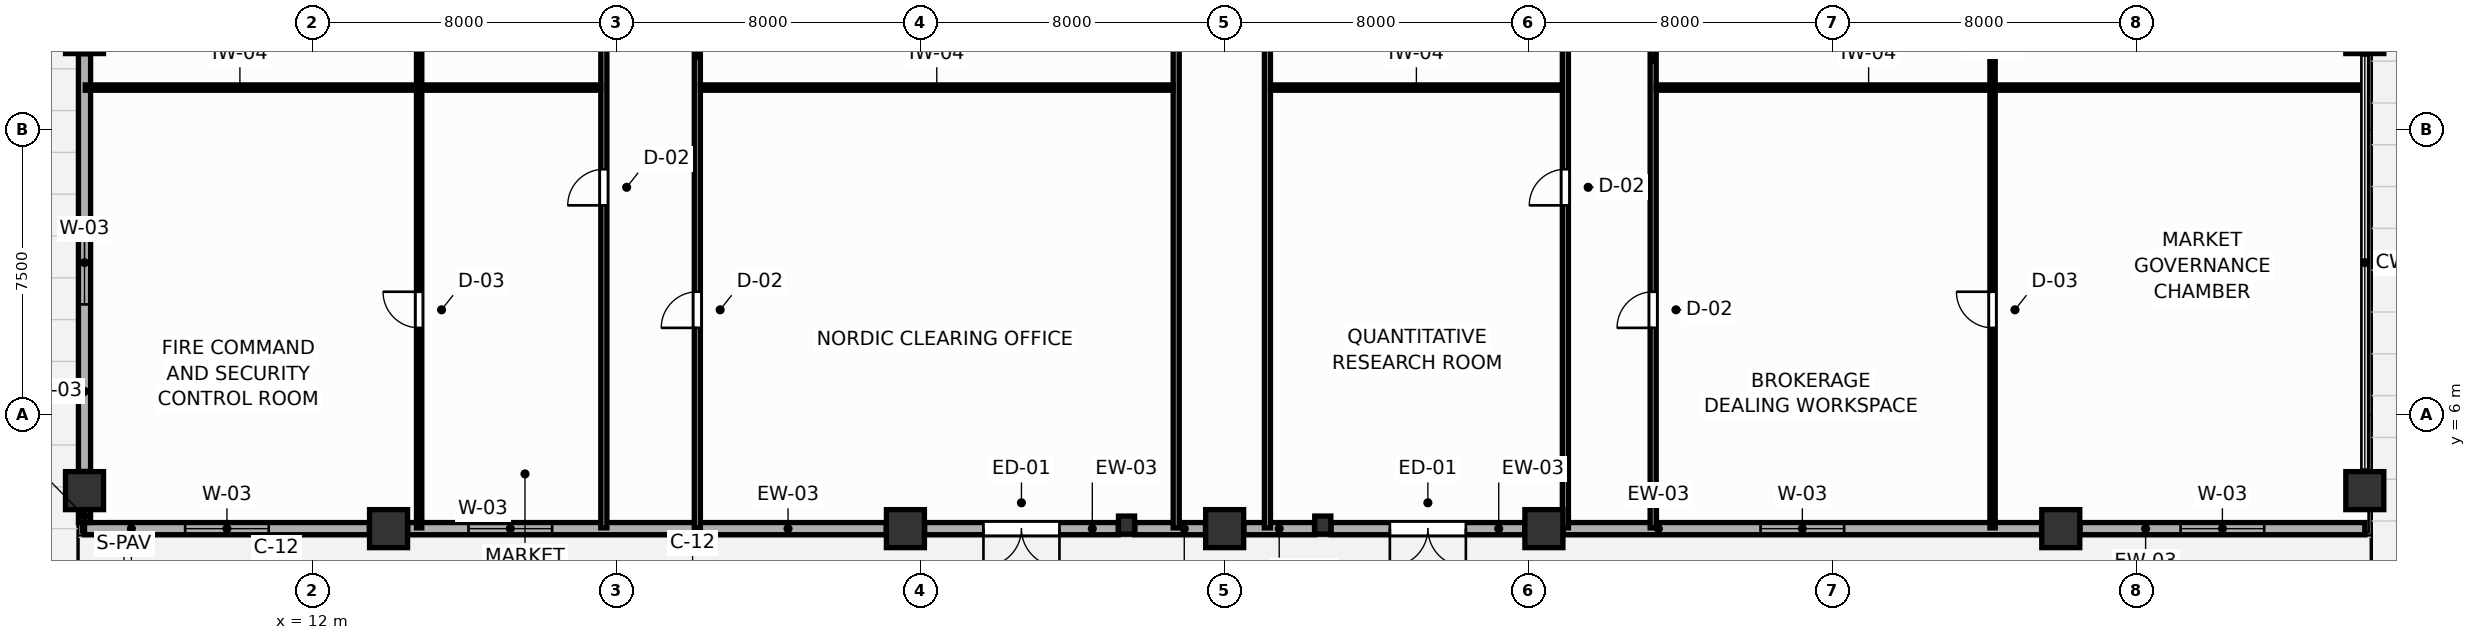
"""IFC4 building model, lengths in metres.
Left out: names, types, materials, properties, quantities, classifications, styles, units other than length and angle.
Written with IfcOpenShell. Run it as: python <this file> out.ifc"""

import sys

from ifc_helpers import new_model, si_unit, direction, frame, frame_2d, origin, origin_2d, place, context, subcontext, project, spatial, rectangle, i_section, extrude, source, transform, mapped, element, fill, save


model = new_model("IFC4")
c1 = context("Model", 3, precision=1e-05, world=origin(), true_north=direction((0.0, 1.0)))
c2 = subcontext(c1, "Body", "Model", "MODEL_VIEW")
j1 = project(units=[si_unit("LENGTHUNIT", "METRE"), si_unit("PLANEANGLEUNIT", "RADIAN")], contexts=[c1])
p1 = place(None, origin())
s1 = spatial("IfcSite", under=j1, at=p1, CompositionType="ELEMENT")
p2 = place(p1, origin())
s2 = spatial("IfcBuilding", under=s1, at=p2, CompositionType="ELEMENT")
p3 = place(p2, origin())
s3 = spatial("IfcBuildingStorey", under=s2, at=p3, CompositionType="ELEMENT", Elevation=0.0)
m1 = source(origin(), c2, "Body", "SweptSolid", [
    extrude(rectangle(XDim=1.0, YDim=1.0, at=origin_2d()), origin(), (0.0, 0.0, 1.0), 4.8),
])
for number, where, z_axis, x_axis in (
    (1, (6.0, 4.0, 0.0), (0.0, 0.0, 1.0), (1.0, 0.0, 0.0)),
    (2, (6.0, 16.0, 0.0), (0.0, 0.0, 1.0), (1.0, 0.0, 0.0)),
    (3, (66.0, 4.0, 0.0), (0.0, 0.0, 1.0), (1.0, 0.0, 0.0)),
    (4, (66.0, 16.0, 0.0), (0.0, 0.0, 1.0), (1.0, 0.0, 0.0)),
    (5, (14.0, 3.0, 0.0), (0.0, 0.0, 1.0), (1.0, 0.0, 0.0)),
    (6, (27.6, 3.0, 0.0), (0.0, 0.0, 1.0), (1.0, 0.0, 0.0)),
    (7, (36.0, 3.0, 0.0), (0.0, 0.0, 1.0), (1.0, 0.0, 0.0)),
    (8, (44.4, 3.0, 0.0), (0.0, 0.0, 1.0), (1.0, 0.0, 0.0)),
    (9, (58.0, 3.0, 0.0), (0.0, 0.0, 1.0), (1.0, 0.0, 0.0)),
):
    element("IfcColumn", number, at=place(p3, frame(where, z_axis=z_axis, x_axis=x_axis)), inside=s3, PredefinedType="COLUMN", context=c2, shape_type="MappedRepresentation", body=[
        mapped(m1, transform((0.0, 0.0, 0.0), scale=1.0)),
    ])
m2 = source(origin(), c2, "Body", "SweptSolid", [
    extrude(i_section(OverallWidth=0.424, OverallDepth=0.474, WebThickness=0.045, FlangeThickness=0.072, FilletRadius=0.015, at=origin_2d()), origin(), (0.0, 0.0, 1.0), 4.8),
])
for number, where, z_axis, x_axis in (
    (10, (33.418, 3.094, 0.0), (0.0, 0.0, 1.0), (1.0, 0.0, 0.0)),
    (11, (38.582, 3.094, 0.0), (0.0, 0.0, 1.0), (1.0, 0.0, 0.0)),
):
    element("IfcColumn", number, at=place(p3, frame(where, z_axis=z_axis, x_axis=x_axis)), inside=s3, PredefinedType="COLUMN", context=c2, shape_type="MappedRepresentation", body=[
        mapped(m2, transform((0.0, 0.0, 0.0), scale=1.0)),
    ])
p4 = place(p3, frame((6.0, 3.0, 0.0), z_axis=(0.0, 0.0, 1.0), x_axis=(1.0, 0.0, 0.0)))
e12 = element("IfcWall", 12, at=p4, inside=s3, PredefinedType="SOLIDWALL", context=c2, shape_type="SweptSolid", body=[
    extrude(rectangle(XDim=7.495, YDim=0.32, at=frame_2d((3.748, 0.0))), origin(), (0.0, 0.0, 1.0), 3.82),
])
p5 = place(p4, frame((2.647, 0.0, 0.75)))
e13 = element("IfcOpeningElement", 13, at=p5, cuts=e12, PredefinedType="OPENING", context=c2, shape_type="SweptSolid", body=[
    extrude(rectangle(XDim=2.2, YDim=2.0, at=frame_2d((1.1, 1.0))), frame((0.0, 0.17, 0.0), z_axis=(0.0, -1.0, 0.0), x_axis=(1.0, 0.0, 0.0)), (0.0, 0.0, 1.0), 0.34),
])
p6 = place(p3, frame((14.505, 3.0, 0.0), z_axis=(0.0, 0.0, 1.0), x_axis=(1.0, 0.0, 0.0)))
e14 = element("IfcWall", 14, at=p6, inside=s3, PredefinedType="SOLIDWALL", context=c2, shape_type="SweptSolid", body=[
    extrude(rectangle(XDim=12.59, YDim=0.32, at=frame_2d((6.295, 0.0))), origin(), (0.0, 0.0, 1.0), 3.82),
])
p7 = place(p6, frame((1.599, 0.0, 0.75)))
e15 = element("IfcOpeningElement", 15, at=p7, cuts=e14, PredefinedType="OPENING", context=c2, shape_type="SweptSolid", body=[
    extrude(rectangle(XDim=2.2, YDim=2.0, at=frame_2d((1.1, 1.0))), frame((0.0, 0.17, 0.0), z_axis=(0.0, -1.0, 0.0), x_axis=(1.0, 0.0, 0.0)), (0.0, 0.0, 1.0), 0.34),
])
p8 = place(p3, frame((28.105, 3.0, 0.0), z_axis=(0.0, 0.0, 1.0), x_axis=(1.0, 0.0, 0.0)))
e16 = element("IfcWall", 16, at=p8, inside=s3, PredefinedType="SOLIDWALL", context=c2, shape_type="SweptSolid", body=[
    extrude(rectangle(XDim=5.096, YDim=0.32, at=frame_2d((2.548, 0.0))), origin(), (0.0, 0.0, 1.0), 3.82),
])
p9 = place(p8, frame((1.548, 0.0, 0.0)))
e17 = element("IfcOpeningElement", 17, at=p9, cuts=e16, PredefinedType="OPENING", context=c2, shape_type="SweptSolid", body=[
    extrude(rectangle(XDim=2.0, YDim=2.25, at=frame_2d((1.0, 1.125))), frame((0.0, 0.17, 0.0), z_axis=(0.0, -1.0, 0.0), x_axis=(1.0, 0.0, 0.0)), (0.0, 0.0, 1.0), 0.34),
])
for number, where, z_axis, x_axis in (
    (18, (33.635, 3.0, 0.0), (0.0, 0.0, 1.0), (1.0, 0.0, 0.0)),
    (19, (36.505, 3.0, 0.0), (0.0, 0.0, 1.0), (1.0, 0.0, 0.0)),
):
    element("IfcWall", number, at=place(p3, frame(where, z_axis=z_axis, x_axis=x_axis)), inside=s3, PredefinedType="SOLIDWALL", context=c2, shape_type="SweptSolid", body=[
        extrude(rectangle(XDim=1.86, YDim=0.32, at=frame_2d((0.93, 0.0))), origin(), (0.0, 0.0, 1.0), 3.82),
    ])
p10 = place(p3, frame((38.799, 3.0, 0.0), z_axis=(0.0, 0.0, 1.0), x_axis=(1.0, 0.0, 0.0)))
e20 = element("IfcWall", 20, at=p10, inside=s3, PredefinedType="SOLIDWALL", context=c2, shape_type="SweptSolid", body=[
    extrude(rectangle(XDim=5.096, YDim=0.32, at=frame_2d((2.548, 0.0))), origin(), (0.0, 0.0, 1.0), 3.82),
])
p11 = place(p10, frame((1.548, 0.0, 0.0)))
e21 = element("IfcOpeningElement", 21, at=p11, cuts=e20, PredefinedType="OPENING", context=c2, shape_type="SweptSolid", body=[
    extrude(rectangle(XDim=2.0, YDim=2.25, at=frame_2d((1.0, 1.125))), frame((0.0, 0.17, 0.0), z_axis=(0.0, -1.0, 0.0), x_axis=(1.0, 0.0, 0.0)), (0.0, 0.0, 1.0), 0.34),
])
p12 = place(p3, frame((44.905, 3.0, 0.0), z_axis=(0.0, 0.0, 1.0), x_axis=(1.0, 0.0, 0.0)))
e22 = element("IfcWall", 22, at=p12, inside=s3, PredefinedType="SOLIDWALL", context=c2, shape_type="SweptSolid", body=[
    extrude(rectangle(XDim=12.59, YDim=0.32, at=frame_2d((6.295, 0.0))), origin(), (0.0, 0.0, 1.0), 3.82),
])
p13 = place(p12, frame((5.195, 0.0, 0.75)))
e23 = element("IfcOpeningElement", 23, at=p13, cuts=e22, PredefinedType="OPENING", context=c2, shape_type="SweptSolid", body=[
    extrude(rectangle(XDim=2.2, YDim=2.0, at=frame_2d((1.1, 1.0))), frame((0.0, 0.17, 0.0), z_axis=(0.0, -1.0, 0.0), x_axis=(1.0, 0.0, 0.0)), (0.0, 0.0, 1.0), 0.34),
])
p14 = place(p3, frame((58.505, 3.0, 0.0), z_axis=(0.0, 0.0, 1.0), x_axis=(1.0, 0.0, 0.0)))
e24 = element("IfcWall", 24, at=p14, inside=s3, PredefinedType="SOLIDWALL", context=c2, shape_type="SweptSolid", body=[
    extrude(rectangle(XDim=7.495, YDim=0.32, at=frame_2d((3.748, 0.0))), origin(), (0.0, 0.0, 1.0), 3.82),
])
p15 = place(p14, frame((2.647, 0.0, 0.75)))
e25 = element("IfcOpeningElement", 25, at=p15, cuts=e24, PredefinedType="OPENING", context=c2, shape_type="SweptSolid", body=[
    extrude(rectangle(XDim=2.2, YDim=2.0, at=frame_2d((1.1, 1.0))), frame((0.0, 0.17, 0.0), z_axis=(0.0, -1.0, 0.0), x_axis=(1.0, 0.0, 0.0)), (0.0, 0.0, 1.0), 0.34),
])
p16 = place(p3, frame((6.0, 3.16, 0.0), z_axis=(0.0, 0.0, 1.0), x_axis=(0.0, 1.0, 0.0)))
e26 = element("IfcWall", 26, at=p16, inside=s3, PredefinedType="SOLIDWALL", context=c2, shape_type="SweptSolid", body=[
    extrude(rectangle(XDim=0.335, YDim=0.32, at=frame_2d((0.167, 0.0))), origin(), (0.0, 0.0, 1.0), 4.52),
])
p17 = place(p3, frame((6.0, 4.505, 0.0), z_axis=(0.0, 0.0, 1.0), x_axis=(0.0, 1.0, 0.0)))
e27 = element("IfcWall", 27, at=p17, inside=s3, PredefinedType="SOLIDWALL", context=c2, shape_type="SweptSolid", body=[
    extrude(rectangle(XDim=10.99, YDim=0.32, at=frame_2d((5.495, 0.0))), origin(), (0.0, 0.0, 1.0), 3.82),
])
p18 = place(p17, frame((4.395, 0.0, 0.75)))
e28 = element("IfcOpeningElement", 28, at=p18, cuts=e27, PredefinedType="OPENING", context=c2, shape_type="SweptSolid", body=[
    extrude(rectangle(XDim=2.2, YDim=2.0, at=frame_2d((1.1, 1.0))), frame((0.0, 0.17, 0.0), z_axis=(0.0, -1.0, 0.0), x_axis=(1.0, 0.0, 0.0)), (0.0, 0.0, 1.0), 0.34),
])
p19 = place(p3, frame((47.275, 3.02, 0.0), z_axis=(0.0, 0.0, 1.0), x_axis=(0.0, 1.0, 0.0)))
e29 = element("IfcWall", 29, at=p19, inside=s3, PredefinedType="PARTITIONING", context=c2, shape_type="SweptSolid", body=[
    extrude(rectangle(XDim=26.76, YDim=0.16, at=frame_2d((13.38, 0.0))), origin(), (0.0, 0.0, 1.0), 4.52),
])
p20 = place(p19, frame((5.263, 0.0, 0.0)))
e30 = element("IfcOpeningElement", 30, at=p20, cuts=e29, PredefinedType="OPENING", context=c2, shape_type="SweptSolid", body=[
    extrude(rectangle(XDim=0.95, YDim=2.05, at=frame_2d((0.475, 1.025))), frame((0.0, 0.09, 0.0), z_axis=(0.0, -1.0, 0.0), x_axis=(1.0, 0.0, 0.0)), (0.0, 0.0, 1.0), 0.18),
])
p21 = place(p19, frame((18.426, 0.0, 0.0)))
e31 = element("IfcOpeningElement", 31, at=p21, cuts=e29, PredefinedType="OPENING", context=c2, shape_type="SweptSolid", body=[
    extrude(rectangle(XDim=0.95, YDim=2.05, at=frame_2d((0.475, 1.025))), frame((0.0, 0.09, 0.0), z_axis=(0.0, -1.0, 0.0), x_axis=(1.0, 0.0, 0.0)), (0.0, 0.0, 1.0), 0.18),
])
p22 = place(p3, frame((44.965, 3.02, 0.0), z_axis=(0.0, 0.0, 1.0), x_axis=(0.0, 1.0, 0.0)))
e32 = element("IfcWall", 32, at=p22, inside=s3, PredefinedType="PARTITIONING", context=c2, shape_type="SweptSolid", body=[
    extrude(rectangle(XDim=26.76, YDim=0.16, at=frame_2d((13.38, 0.0))), origin(), (0.0, 0.0, 1.0), 4.52),
])
p23 = place(p22, frame((8.486, 0.0, 0.0)))
e33 = element("IfcOpeningElement", 33, at=p23, cuts=e32, PredefinedType="OPENING", context=c2, shape_type="SweptSolid", body=[
    extrude(rectangle(XDim=0.95, YDim=2.05, at=frame_2d((0.475, 1.025))), frame((0.0, 0.09, 0.0), z_axis=(0.0, -1.0, 0.0), x_axis=(1.0, 0.0, 0.0)), (0.0, 0.0, 1.0), 0.18),
])
p24 = place(p22, frame((15.215, 0.0, 0.0)))
e34 = element("IfcOpeningElement", 34, at=p24, cuts=e32, PredefinedType="OPENING", context=c2, shape_type="SweptSolid", body=[
    extrude(rectangle(XDim=0.95, YDim=2.05, at=frame_2d((0.475, 1.025))), frame((0.0, 0.09, 0.0), z_axis=(0.0, -1.0, 0.0), x_axis=(1.0, 0.0, 0.0)), (0.0, 0.0, 1.0), 0.18),
])
p25 = place(p3, frame((37.125, 3.02, 0.0), z_axis=(0.0, 0.0, 1.0), x_axis=(0.0, 1.0, 0.0)))
e35 = element("IfcWall", 35, at=p25, inside=s3, PredefinedType="PARTITIONING", context=c2, shape_type="SweptSolid", body=[
    extrude(rectangle(XDim=26.76, YDim=0.16, at=frame_2d((13.38, 0.0))), origin(), (0.0, 0.0, 1.0), 4.52),
])
p26 = place(p3, frame((22.125, 3.02, 0.0), z_axis=(0.0, 0.0, 1.0), x_axis=(0.0, 1.0, 0.0)))
e36 = element("IfcWall", 36, at=p26, inside=s3, PredefinedType="PARTITIONING", context=c2, shape_type="SweptSolid", body=[
    extrude(rectangle(XDim=26.76, YDim=0.16, at=frame_2d((13.38, 0.0))), origin(), (0.0, 0.0, 1.0), 4.52),
])
p27 = place(p26, frame((5.263, 0.0, 0.0)))
e37 = element("IfcOpeningElement", 37, at=p27, cuts=e36, PredefinedType="OPENING", context=c2, shape_type="SweptSolid", body=[
    extrude(rectangle(XDim=0.95, YDim=2.05, at=frame_2d((0.475, 1.025))), frame((0.0, 0.09, 0.0), z_axis=(0.0, -1.0, 0.0), x_axis=(1.0, 0.0, 0.0)), (0.0, 0.0, 1.0), 0.18),
])
p28 = place(p26, frame((18.64, 0.0, 0.0)))
e38 = element("IfcOpeningElement", 38, at=p28, cuts=e36, PredefinedType="OPENING", context=c2, shape_type="SweptSolid", body=[
    extrude(rectangle(XDim=0.95, YDim=2.05, at=frame_2d((0.475, 1.025))), frame((0.0, 0.09, 0.0), z_axis=(0.0, -1.0, 0.0), x_axis=(1.0, 0.0, 0.0)), (0.0, 0.0, 1.0), 0.18),
])
p29 = place(p3, frame((34.725, 3.02, 0.0), z_axis=(0.0, 0.0, 1.0), x_axis=(0.0, 1.0, 0.0)))
e39 = element("IfcWall", 39, at=p29, inside=s3, PredefinedType="PARTITIONING", context=c2, shape_type="SweptSolid", body=[
    extrude(rectangle(XDim=26.76, YDim=0.16, at=frame_2d((13.38, 0.0))), origin(), (0.0, 0.0, 1.0), 4.52),
])
p30 = place(p3, frame((19.665, 3.02, 0.0), z_axis=(0.0, 0.0, 1.0), x_axis=(0.0, 1.0, 0.0)))
e40 = element("IfcWall", 40, at=p30, inside=s3, PredefinedType="PARTITIONING", context=c2, shape_type="SweptSolid", body=[
    extrude(rectangle(XDim=26.76, YDim=0.16, at=frame_2d((13.38, 0.0))), origin(), (0.0, 0.0, 1.0), 4.52),
])
p31 = place(p30, frame((8.486, 0.0, 0.0)))
e41 = element("IfcOpeningElement", 41, at=p31, cuts=e40, PredefinedType="OPENING", context=c2, shape_type="SweptSolid", body=[
    extrude(rectangle(XDim=0.95, YDim=2.05, at=frame_2d((0.475, 1.025))), frame((0.0, 0.09, 0.0), z_axis=(0.0, -1.0, 0.0), x_axis=(1.0, 0.0, 0.0)), (0.0, 0.0, 1.0), 0.18),
])
p32 = place(p30, frame((15.429, 0.0, 0.0)))
e42 = element("IfcOpeningElement", 42, at=p32, cuts=e40, PredefinedType="OPENING", context=c2, shape_type="SweptSolid", body=[
    extrude(rectangle(XDim=0.95, YDim=2.05, at=frame_2d((0.475, 1.025))), frame((0.0, 0.09, 0.0), z_axis=(0.0, -1.0, 0.0), x_axis=(1.0, 0.0, 0.0)), (0.0, 0.0, 1.0), 0.18),
])
p33 = place(p3, frame((56.205, 3.02, 0.0), z_axis=(0.0, 0.0, 1.0), x_axis=(0.0, 1.0, 0.0)))
e43 = element("IfcWall", 43, at=p33, inside=s3, PredefinedType="PARTITIONING", context=c2, shape_type="SweptSolid", body=[
    extrude(rectangle(XDim=26.673, YDim=0.14, at=frame_2d((13.336, 0.0))), origin(), (0.0, 0.0, 1.0), 4.52),
])
p34 = place(p33, frame((5.263, 0.0, 0.0)))
e44 = element("IfcOpeningElement", 44, at=p34, cuts=e43, PredefinedType="OPENING", context=c2, shape_type="SweptSolid", body=[
    extrude(rectangle(XDim=0.95, YDim=2.05, at=frame_2d((0.475, 1.025))), frame((0.0, 0.08, 0.0), z_axis=(0.0, -1.0, 0.0), x_axis=(1.0, 0.0, 0.0)), (0.0, 0.0, 1.0), 0.16),
])
p35 = place(p33, frame((17.408, 0.0, 0.0)))
e45 = element("IfcOpeningElement", 45, at=p35, cuts=e43, PredefinedType="OPENING", context=c2, shape_type="SweptSolid", body=[
    extrude(rectangle(XDim=0.95, YDim=2.05, at=frame_2d((0.475, 1.025))), frame((0.0, 0.08, 0.0), z_axis=(0.0, -1.0, 0.0), x_axis=(1.0, 0.0, 0.0)), (0.0, 0.0, 1.0), 0.16),
])
p36 = place(p3, frame((14.805, 3.02, 0.0), z_axis=(0.0, 0.0, 1.0), x_axis=(0.0, 1.0, 0.0)))
e46 = element("IfcWall", 46, at=p36, inside=s3, PredefinedType="PARTITIONING", context=c2, shape_type="SweptSolid", body=[
    extrude(rectangle(XDim=26.673, YDim=0.14, at=frame_2d((13.336, 0.0))), origin(), (0.0, 0.0, 1.0), 4.52),
])
p37 = place(p36, frame((5.263, 0.0, 0.0)))
e47 = element("IfcOpeningElement", 47, at=p37, cuts=e46, PredefinedType="OPENING", context=c2, shape_type="SweptSolid", body=[
    extrude(rectangle(XDim=0.95, YDim=2.05, at=frame_2d((0.475, 1.025))), frame((0.0, 0.08, 0.0), z_axis=(0.0, -1.0, 0.0), x_axis=(1.0, 0.0, 0.0)), (0.0, 0.0, 1.0), 0.16),
])
p38 = place(p3, frame((47.357, 14.605, 0.0), z_axis=(0.0, 0.0, 1.0), x_axis=(1.0, 0.0, 0.0)))
e48 = element("IfcWall", 48, at=p38, inside=s3, PredefinedType="PARTITIONING", context=c2, shape_type="SweptSolid", body=[
    extrude(rectangle(XDim=18.623, YDim=0.14, at=frame_2d((9.312, 0.0))), origin(), (0.0, 0.0, 1.0), 4.52),
])
p39 = place(p3, frame((6.02, 14.605, 0.0), z_axis=(0.0, 0.0, 1.0), x_axis=(1.0, 0.0, 0.0)))
e49 = element("IfcWall", 49, at=p39, inside=s3, PredefinedType="PARTITIONING", context=c2, shape_type="SweptSolid", body=[
    extrude(rectangle(XDim=13.563, YDim=0.14, at=frame_2d((6.781, 0.0))), origin(), (0.0, 0.0, 1.0), 4.52),
])
p40 = place(p3, frame((22.207, 14.605, 0.0), z_axis=(0.0, 0.0, 1.0), x_axis=(1.0, 0.0, 0.0)))
e50 = element("IfcWall", 50, at=p40, inside=s3, PredefinedType="PARTITIONING", context=c2, shape_type="SweptSolid", body=[
    extrude(rectangle(XDim=12.436, YDim=0.14, at=frame_2d((6.218, 0.0))), origin(), (0.0, 0.0, 1.0), 4.52),
])
p41 = place(p3, frame((37.207, 14.605, 0.0), z_axis=(0.0, 0.0, 1.0), x_axis=(1.0, 0.0, 0.0)))
e51 = element("IfcWall", 51, at=p41, inside=s3, PredefinedType="PARTITIONING", context=c2, shape_type="SweptSolid", body=[
    extrude(rectangle(XDim=7.676, YDim=0.14, at=frame_2d((3.838, 0.0))), origin(), (0.0, 0.0, 1.0), 4.52),
])
p42 = place(p5, origin())
e52 = element("IfcWindow", 52, at=p42, inside=s3, PartitioningType="SINGLE_PANEL", PredefinedType="WINDOW", context=c2, shape_type="SweptSolid", body=[
    extrude(rectangle(XDim=2.2, YDim=2.0, at=frame_2d((1.1, 1.0))), frame((0.0, 0.03, 0.0), z_axis=(0.0, -1.0, 0.0), x_axis=(1.0, 0.0, 0.0)), (0.0, 0.0, 1.0), 0.06),
])
fill(e13, e52)
p43 = place(p7, origin())
e53 = element("IfcWindow", 53, at=p43, inside=s3, PartitioningType="SINGLE_PANEL", PredefinedType="WINDOW", context=c2, shape_type="SweptSolid", body=[
    extrude(rectangle(XDim=2.2, YDim=2.0, at=frame_2d((1.1, 1.0))), frame((0.0, 0.03, 0.0), z_axis=(0.0, -1.0, 0.0), x_axis=(1.0, 0.0, 0.0)), (0.0, 0.0, 1.0), 0.06),
])
fill(e15, e53)
p44 = place(p9, frame((2.0, 0.0, 0.0), z_axis=(0.0, 0.0, 1.0), x_axis=(-1.0, 0.0, 0.0)))
e54 = element("IfcDoor", 54, at=p44, inside=s3, OperationType="DOUBLE_DOOR_SINGLE_SWING", PredefinedType="DOOR", context=c2, shape_type="SweptSolid", body=[
    extrude(rectangle(XDim=2.0, YDim=2.25, at=frame_2d((1.0, 1.125))), frame((0.0, 0.025, 0.0), z_axis=(0.0, -1.0, 0.0), x_axis=(1.0, 0.0, 0.0)), (0.0, 0.0, 1.0), 0.05),
])
fill(e17, e54)
p45 = place(p11, frame((2.0, 0.0, 0.0), z_axis=(0.0, 0.0, 1.0), x_axis=(-1.0, 0.0, 0.0)))
e55 = element("IfcDoor", 55, at=p45, inside=s3, OperationType="DOUBLE_DOOR_SINGLE_SWING", PredefinedType="DOOR", context=c2, shape_type="SweptSolid", body=[
    extrude(rectangle(XDim=2.0, YDim=2.25, at=frame_2d((1.0, 1.125))), frame((0.0, 0.025, 0.0), z_axis=(0.0, -1.0, 0.0), x_axis=(1.0, 0.0, 0.0)), (0.0, 0.0, 1.0), 0.05),
])
fill(e21, e55)
p46 = place(p13, origin())
e56 = element("IfcWindow", 56, at=p46, inside=s3, PartitioningType="SINGLE_PANEL", PredefinedType="WINDOW", context=c2, shape_type="SweptSolid", body=[
    extrude(rectangle(XDim=2.2, YDim=2.0, at=frame_2d((1.1, 1.0))), frame((0.0, 0.03, 0.0), z_axis=(0.0, -1.0, 0.0), x_axis=(1.0, 0.0, 0.0)), (0.0, 0.0, 1.0), 0.06),
])
fill(e23, e56)
p47 = place(p15, origin())
e57 = element("IfcWindow", 57, at=p47, inside=s3, PartitioningType="SINGLE_PANEL", PredefinedType="WINDOW", context=c2, shape_type="SweptSolid", body=[
    extrude(rectangle(XDim=2.2, YDim=2.0, at=frame_2d((1.1, 1.0))), frame((0.0, 0.03, 0.0), z_axis=(0.0, -1.0, 0.0), x_axis=(1.0, 0.0, 0.0)), (0.0, 0.0, 1.0), 0.06),
])
fill(e25, e57)
p48 = place(p18, origin())
e58 = element("IfcWindow", 58, at=p48, inside=s3, PartitioningType="SINGLE_PANEL", PredefinedType="WINDOW", context=c2, shape_type="SweptSolid", body=[
    extrude(rectangle(XDim=2.2, YDim=2.0, at=frame_2d((1.1, 1.0))), frame((0.0, 0.03, 0.0), z_axis=(0.0, -1.0, 0.0), x_axis=(1.0, 0.0, 0.0)), (0.0, 0.0, 1.0), 0.06),
])
fill(e28, e58)
p49 = place(p20, origin())
e59 = element("IfcDoor", 59, at=p49, inside=s3, OperationType="SINGLE_SWING_LEFT", PredefinedType="DOOR", context=c2, shape_type="SweptSolid", body=[
    extrude(rectangle(XDim=0.95, YDim=2.05, at=frame_2d((0.475, 1.025))), frame((0.0, 0.025, 0.0), z_axis=(0.0, -1.0, 0.0), x_axis=(1.0, 0.0, 0.0)), (0.0, 0.0, 1.0), 0.05),
])
fill(e30, e59)
p50 = place(p23, origin())
e60 = element("IfcDoor", 60, at=p50, inside=s3, OperationType="SINGLE_SWING_LEFT", PredefinedType="DOOR", context=c2, shape_type="SweptSolid", body=[
    extrude(rectangle(XDim=0.95, YDim=2.05, at=frame_2d((0.475, 1.025))), frame((0.0, 0.025, 0.0), z_axis=(0.0, -1.0, 0.0), x_axis=(1.0, 0.0, 0.0)), (0.0, 0.0, 1.0), 0.05),
])
fill(e33, e60)
p51 = place(p27, origin())
e61 = element("IfcDoor", 61, at=p51, inside=s3, OperationType="SINGLE_SWING_LEFT", PredefinedType="DOOR", context=c2, shape_type="SweptSolid", body=[
    extrude(rectangle(XDim=0.95, YDim=2.05, at=frame_2d((0.475, 1.025))), frame((0.0, 0.025, 0.0), z_axis=(0.0, -1.0, 0.0), x_axis=(1.0, 0.0, 0.0)), (0.0, 0.0, 1.0), 0.05),
])
fill(e37, e61)
p52 = place(p31, origin())
e62 = element("IfcDoor", 62, at=p52, inside=s3, OperationType="SINGLE_SWING_LEFT", PredefinedType="DOOR", context=c2, shape_type="SweptSolid", body=[
    extrude(rectangle(XDim=0.95, YDim=2.05, at=frame_2d((0.475, 1.025))), frame((0.0, 0.025, 0.0), z_axis=(0.0, -1.0, 0.0), x_axis=(1.0, 0.0, 0.0)), (0.0, 0.0, 1.0), 0.05),
])
fill(e41, e62)
p53 = place(p34, origin())
e63 = element("IfcDoor", 63, at=p53, inside=s3, OperationType="SINGLE_SWING_RIGHT", PredefinedType="DOOR", context=c2, shape_type="SweptSolid", body=[
    extrude(rectangle(XDim=0.95, YDim=2.05, at=frame_2d((0.475, 1.025))), frame((0.0, 0.025, 0.0), z_axis=(0.0, -1.0, 0.0), x_axis=(1.0, 0.0, 0.0)), (0.0, 0.0, 1.0), 0.05),
])
fill(e44, e63)
p54 = place(p37, origin())
e64 = element("IfcDoor", 64, at=p54, inside=s3, OperationType="SINGLE_SWING_RIGHT", PredefinedType="DOOR", context=c2, shape_type="SweptSolid", body=[
    extrude(rectangle(XDim=0.95, YDim=2.05, at=frame_2d((0.475, 1.025))), frame((0.0, 0.025, 0.0), z_axis=(0.0, -1.0, 0.0), x_axis=(1.0, 0.0, 0.0)), (0.0, 0.0, 1.0), 0.05),
])
fill(e47, e64)
save(model, sys.argv[1])
